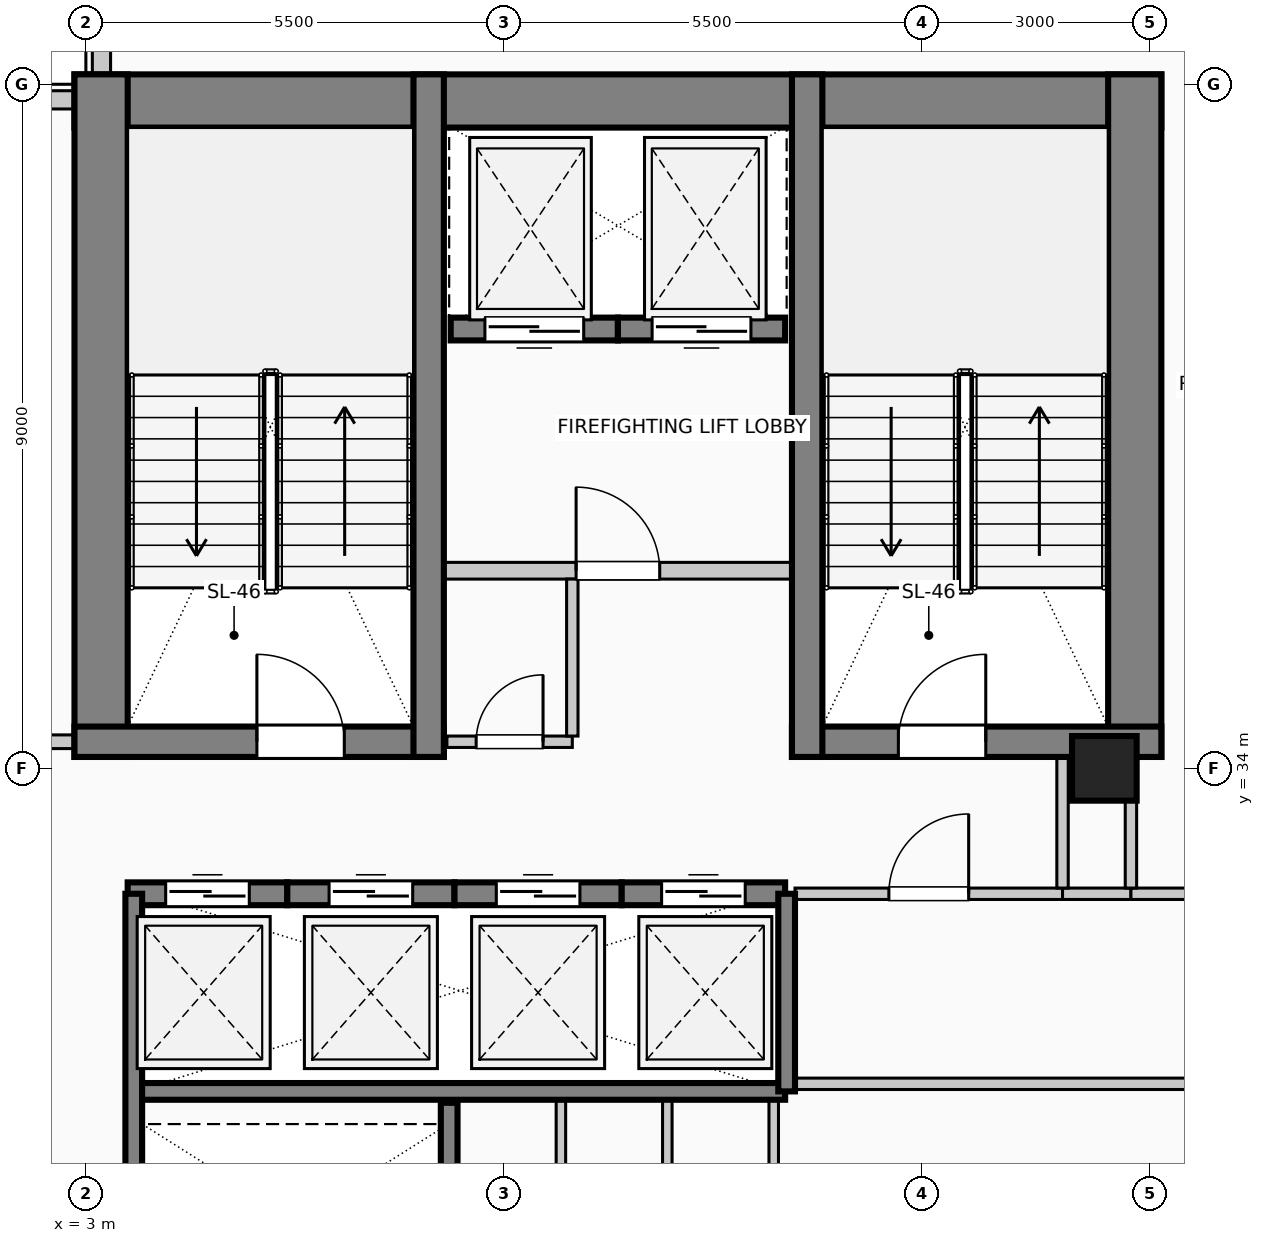
"""IFC4 building model, lengths in metres.
Left out: names, types, materials, properties, quantities, classifications, styles, units other than length and angle.
Written with IfcOpenShell. Run it as: python <this file> out.ifc"""

import sys

from ifc_helpers import new_model, si_unit, direction, frame, frame_2d, origin, origin_2d, place, context, subcontext, project, spatial, rectangle, circle, extrude, element, fill, save


model = new_model("IFC4")
c1 = context("Model", 3, precision=1e-05, world=origin(), true_north=direction((0.0, 1.0)))
c2 = subcontext(c1, "Body", "Model", "MODEL_VIEW")
j1 = project(units=[si_unit("LENGTHUNIT", "METRE"), si_unit("PLANEANGLEUNIT", "RADIAN")], contexts=[c1])
p1 = place(None, origin())
s1 = spatial("IfcSite", under=j1, at=p1, CompositionType="ELEMENT")
p2 = place(p1, origin())
s2 = spatial("IfcBuilding", under=s1, at=p2, CompositionType="ELEMENT")
p3 = place(p2, frame((0.0, 0.0, 248.6)))
s3 = spatial("IfcBuildingStorey", under=s2, at=p3, CompositionType="ELEMENT", Elevation=248.6)
p4 = place(p3, frame((2.85, 42.78, 0.0), z_axis=(0.0, 0.0, 1.0), x_axis=(1.0, 0.0, 0.0)))
e1 = element("IfcWall", 1, at=p4, inside=s3, PredefinedType="SHEAR", context=c2, shape_type="SweptSolid", body=[
    extrude(rectangle(XDim=14.3, YDim=0.7, at=frame_2d((7.15, 0.0))), origin(), (0.0, 0.0, 1.0), 4.0),
])
for number, where, z_axis, x_axis in (
    (2, (3.2, 34.15, 0.0), (0.0, 0.0, 1.0), (0.0, 1.0, 0.0)),
    (3, (16.8, 34.15, 0.0), (0.0, 0.0, 1.0), (0.0, 1.0, 0.0)),
):
    element("IfcWall", number, at=place(p3, frame(where, z_axis=z_axis, x_axis=x_axis)), inside=s3, PredefinedType="SHEAR", context=c2, shape_type="SweptSolid", body=[
        extrude(rectangle(XDim=8.98, YDim=0.7, at=frame_2d((4.49, 0.0))), origin(), (0.0, 0.0, 1.0), 4.0),
    ])
p5 = place(p3, frame((2.85, 34.35, 0.0), z_axis=(0.0, 0.0, 1.0), x_axis=(1.0, 0.0, 0.0)))
e4 = element("IfcWall", 4, at=p5, inside=s3, PredefinedType="SHEAR", context=c2, shape_type="SweptSolid", body=[
    extrude(rectangle(XDim=4.86, YDim=0.4, at=frame_2d((2.43, 0.0))), origin(), (0.0, 0.0, 1.0), 4.0),
])
p6 = place(p5, frame((2.4, 0.0, 0.0)))
e5 = element("IfcOpeningElement", 5, at=p6, cuts=e4, PredefinedType="OPENING", context=c2, shape_type="SweptSolid", body=[
    extrude(rectangle(XDim=1.15, YDim=2.2, at=frame_2d((0.575, 1.1))), frame((0.0, 0.21, 0.0), z_axis=(0.0, -1.0, 0.0), x_axis=(1.0, 0.0, 0.0)), (0.0, 0.0, 1.0), 0.42),
])
p7 = place(p3, frame((12.29, 34.35, 0.0), z_axis=(0.0, 0.0, 1.0), x_axis=(1.0, 0.0, 0.0)))
e6 = element("IfcWall", 6, at=p7, inside=s3, PredefinedType="SHEAR", context=c2, shape_type="SweptSolid", body=[
    extrude(rectangle(XDim=4.86, YDim=0.4, at=frame_2d((2.43, 0.0))), origin(), (0.0, 0.0, 1.0), 4.0),
])
p8 = place(p7, frame((1.4, 0.0, 0.0)))
e7 = element("IfcOpeningElement", 7, at=p8, cuts=e6, PredefinedType="OPENING", context=c2, shape_type="SweptSolid", body=[
    extrude(rectangle(XDim=1.15, YDim=2.2, at=frame_2d((0.575, 1.1))), frame((0.0, 0.21, 0.0), z_axis=(0.0, -1.0, 0.0), x_axis=(1.0, 0.0, 0.0)), (0.0, 0.0, 1.0), 0.42),
])
for number, where, z_axis, x_axis in (
    (8, (7.51, 34.15, 0.0), (0.0, 0.0, 1.0), (0.0, 1.0, 0.0)),
    (9, (12.49, 34.15, 0.0), (0.0, 0.0, 1.0), (0.0, 1.0, 0.0)),
):
    element("IfcWall", number, at=place(p3, frame(where, z_axis=z_axis, x_axis=x_axis)), inside=s3, PredefinedType="SHEAR", context=c2, shape_type="SweptSolid", body=[
        extrude(rectangle(XDim=8.98, YDim=0.4, at=frame_2d((4.49, 0.0))), origin(), (0.0, 0.0, 1.0), 4.0),
    ])
p9 = place(p3, frame((16.4, 34.0, 0.0), z_axis=(0.0, 0.0, 1.0), x_axis=(1.0, 0.0, 0.0)))
e10 = element("IfcColumn", 10, at=p9, inside=s3, PredefinedType="COLUMN", context=c2, shape_type="SweptSolid", body=[
    extrude(circle(Radius=0.425, at=origin_2d()), origin(), (0.0, 0.0, 1.0), 4.0),
])
p10 = place(p3, frame((0.6, 42.795, 0.0), z_axis=(0.0, 0.0, 1.0), x_axis=(1.0, 0.0, 0.0)))
e11 = element("IfcWall", 11, at=p10, inside=s3, PredefinedType="SOLIDWALL", context=c2, shape_type="SweptSolid", body=[
    extrude(rectangle(XDim=2.245, YDim=0.24, at=frame_2d((1.123, 0.0))), origin(), (0.0, 0.0, 1.0), 3.75),
])
p11 = place(p3, frame((3.205, 43.135, 0.0), z_axis=(0.0, 0.0, 1.0), x_axis=(0.0, 1.0, 0.0)))
e12 = element("IfcWall", 12, at=p11, inside=s3, PredefinedType="SOLIDWALL", context=c2, shape_type="SweptSolid", body=[
    extrude(rectangle(XDim=2.265, YDim=0.24, at=frame_2d((1.132, 0.0))), origin(), (0.0, 0.0, 1.0), 3.75),
])
p12 = place(p3, frame((3.55, 32.35, 0.0), z_axis=(0.0, 0.0, 1.0), x_axis=(1.0, 0.0, 0.0)))
e13 = element("IfcWall", 13, at=p12, inside=s3, PredefinedType="SOLIDWALL", context=c2, shape_type="SweptSolid", body=[
    extrude(rectangle(XDim=2.1, YDim=0.3, at=frame_2d((1.05, 0.0))), origin(), (0.0, 0.0, 1.0), 4.0),
])
p13 = place(p12, frame((0.5, 0.0, 0.0)))
e14 = element("IfcOpeningElement", 14, at=p13, cuts=e13, PredefinedType="OPENING", context=c2, shape_type="SweptSolid", body=[
    extrude(rectangle(XDim=1.1, YDim=2.2, at=frame_2d((0.55, 1.1))), frame((0.0, 0.16, 0.0), z_axis=(0.0, -1.0, 0.0), x_axis=(1.0, 0.0, 0.0)), (0.0, 0.0, 1.0), 0.32),
])
p14 = place(p3, frame((5.65, 32.35, 0.0), z_axis=(0.0, 0.0, 1.0), x_axis=(1.0, 0.0, 0.0)))
e15 = element("IfcWall", 15, at=p14, inside=s3, PredefinedType="SOLIDWALL", context=c2, shape_type="SweptSolid", body=[
    extrude(rectangle(XDim=2.2, YDim=0.3, at=frame_2d((1.1, 0.0))), origin(), (0.0, 0.0, 1.0), 4.0),
])
p15 = place(p14, frame((0.55, 0.0, 0.0)))
e16 = element("IfcOpeningElement", 16, at=p15, cuts=e15, PredefinedType="OPENING", context=c2, shape_type="SweptSolid", body=[
    extrude(rectangle(XDim=1.1, YDim=2.2, at=frame_2d((0.55, 1.1))), frame((0.0, 0.16, 0.0), z_axis=(0.0, -1.0, 0.0), x_axis=(1.0, 0.0, 0.0)), (0.0, 0.0, 1.0), 0.32),
])
p16 = place(p3, frame((7.85, 32.35, 0.0), z_axis=(0.0, 0.0, 1.0), x_axis=(1.0, 0.0, 0.0)))
e17 = element("IfcWall", 17, at=p16, inside=s3, PredefinedType="SOLIDWALL", context=c2, shape_type="SweptSolid", body=[
    extrude(rectangle(XDim=2.2, YDim=0.3, at=frame_2d((1.1, 0.0))), origin(), (0.0, 0.0, 1.0), 4.0),
])
p17 = place(p16, frame((0.55, 0.0, 0.0)))
e18 = element("IfcOpeningElement", 18, at=p17, cuts=e17, PredefinedType="OPENING", context=c2, shape_type="SweptSolid", body=[
    extrude(rectangle(XDim=1.1, YDim=2.2, at=frame_2d((0.55, 1.1))), frame((0.0, 0.16, 0.0), z_axis=(0.0, -1.0, 0.0), x_axis=(1.0, 0.0, 0.0)), (0.0, 0.0, 1.0), 0.32),
])
p18 = place(p3, frame((10.05, 32.35, 0.0), z_axis=(0.0, 0.0, 1.0), x_axis=(1.0, 0.0, 0.0)))
e19 = element("IfcWall", 19, at=p18, inside=s3, PredefinedType="SOLIDWALL", context=c2, shape_type="SweptSolid", body=[
    extrude(rectangle(XDim=2.15, YDim=0.3, at=frame_2d((1.075, 0.0))), origin(), (0.0, 0.0, 1.0), 4.0),
])
p19 = place(p18, frame((0.525, 0.0, 0.0)))
e20 = element("IfcOpeningElement", 20, at=p19, cuts=e19, PredefinedType="OPENING", context=c2, shape_type="SweptSolid", body=[
    extrude(rectangle(XDim=1.1, YDim=2.2, at=frame_2d((0.55, 1.1))), frame((0.0, 0.16, 0.0), z_axis=(0.0, -1.0, 0.0), x_axis=(1.0, 0.0, 0.0)), (0.0, 0.0, 1.0), 0.32),
])
p20 = place(p3, frame((10.0, 39.78, 0.0), z_axis=(0.0, 0.0, 1.0), x_axis=(-1.0, 0.0, 0.0)))
e21 = element("IfcWall", 21, at=p20, inside=s3, PredefinedType="SOLIDWALL", context=c2, shape_type="SweptSolid", body=[
    extrude(rectangle(XDim=2.2, YDim=0.3, at=frame_2d((1.1, 0.0))), origin(), (0.0, 0.0, 1.0), 4.0),
])
p21 = place(p20, frame((0.45, 0.0, 0.0)))
e22 = element("IfcOpeningElement", 22, at=p21, cuts=e21, PredefinedType="OPENING", context=c2, shape_type="SweptSolid", body=[
    extrude(rectangle(XDim=1.3, YDim=2.25, at=frame_2d((0.65, 1.125))), frame((0.0, 0.16, 0.0), z_axis=(0.0, -1.0, 0.0), x_axis=(1.0, 0.0, 0.0)), (0.0, 0.0, 1.0), 0.32),
])
p22 = place(p3, frame((12.2, 39.78, 0.0), z_axis=(0.0, 0.0, 1.0), x_axis=(-1.0, 0.0, 0.0)))
e23 = element("IfcWall", 23, at=p22, inside=s3, PredefinedType="SOLIDWALL", context=c2, shape_type="SweptSolid", body=[
    extrude(rectangle(XDim=2.2, YDim=0.3, at=frame_2d((1.1, 0.0))), origin(), (0.0, 0.0, 1.0), 4.0),
])
p23 = place(p22, frame((0.45, 0.0, 0.0)))
e24 = element("IfcOpeningElement", 24, at=p23, cuts=e23, PredefinedType="OPENING", context=c2, shape_type="SweptSolid", body=[
    extrude(rectangle(XDim=1.3, YDim=2.25, at=frame_2d((0.65, 1.125))), frame((0.0, 0.16, 0.0), z_axis=(0.0, -1.0, 0.0), x_axis=(1.0, 0.0, 0.0)), (0.0, 0.0, 1.0), 0.32),
])
p24 = place(p3, frame((3.55, 29.75, 0.0), z_axis=(0.0, 0.0, 1.0), x_axis=(1.0, 0.0, 0.0)))
e25 = element("IfcWall", 25, at=p24, inside=s3, PredefinedType="SOLIDWALL", context=c2, shape_type="SweptSolid", body=[
    extrude(rectangle(XDim=8.65, YDim=0.22, at=frame_2d((4.325, 0.0))), origin(), (0.0, 0.0, 1.0), 4.0),
])
p25 = place(p3, frame((3.63, 26.8, 0.0), z_axis=(0.0, 0.0, 1.0), x_axis=(0.0, 1.0, 0.0)))
e26 = element("IfcWall", 26, at=p25, inside=s3, PredefinedType="SOLIDWALL", context=c2, shape_type="SweptSolid", body=[
    extrude(rectangle(XDim=5.55, YDim=0.22, at=frame_2d((2.775, 0.0))), origin(), (0.0, 0.0, 1.0), 4.0),
])
p26 = place(p3, frame((7.78, 26.8, 0.0), z_axis=(0.0, 0.0, 1.0), x_axis=(0.0, 1.0, 0.0)))
e27 = element("IfcWall", 27, at=p26, inside=s3, PredefinedType="SOLIDWALL", context=c2, shape_type="SweptSolid", body=[
    extrude(rectangle(XDim=2.8, YDim=0.22, at=frame_2d((1.4, 0.0))), origin(), (0.0, 0.0, 1.0), 4.0),
])
p27 = place(p3, frame((12.22, 29.75, 0.0), z_axis=(0.0, 0.0, 1.0), x_axis=(0.0, 1.0, 0.0)))
e28 = element("IfcWall", 28, at=p27, inside=s3, PredefinedType="SOLIDWALL", context=c2, shape_type="SweptSolid", body=[
    extrude(rectangle(XDim=2.6, YDim=0.22, at=frame_2d((1.3, 0.0))), origin(), (0.0, 0.0, 1.0), 4.0),
])
p28 = place(p3, frame((7.51, 36.6, 0.0), z_axis=(0.0, 0.0, 1.0), x_axis=(1.0, 0.0, 0.0)))
e29 = element("IfcWall", 29, at=p28, inside=s3, PredefinedType="PARTITIONING", context=c2, shape_type="SweptSolid", body=[
    extrude(rectangle(XDim=4.98, YDim=0.22, at=frame_2d((2.49, 0.0))), origin(), (0.0, 0.0, 1.0), 3.75),
])
p29 = place(p28, frame((1.94, 0.0, 0.0)))
e30 = element("IfcOpeningElement", 30, at=p29, cuts=e29, PredefinedType="OPENING", context=c2, shape_type="SweptSolid", body=[
    extrude(rectangle(XDim=1.1, YDim=2.2, at=frame_2d((0.55, 1.1))), frame((0.0, 0.12, 0.0), z_axis=(0.0, -1.0, 0.0), x_axis=(1.0, 0.0, 0.0)), (0.0, 0.0, 1.0), 0.24),
])
p30 = place(p3, frame((12.33, 29.85, 0.0), z_axis=(0.0, 0.0, 1.0), x_axis=(1.0, 0.0, 0.0)))
e31 = element("IfcWall", 31, at=p30, inside=s3, PredefinedType="PARTITIONING", context=c2, shape_type="SweptSolid", body=[
    extrude(rectangle(XDim=8.67, YDim=0.15, at=frame_2d((4.335, 0.0))), origin(), (0.0, 0.0, 1.0), 3.75),
])
p31 = place(p3, frame((12.33, 32.35, 0.0), z_axis=(0.0, 0.0, 1.0), x_axis=(1.0, 0.0, 0.0)))
e32 = element("IfcWall", 32, at=p31, inside=s3, PredefinedType="PARTITIONING", context=c2, shape_type="SweptSolid", body=[
    extrude(rectangle(XDim=3.52, YDim=0.15, at=frame_2d((1.76, 0.0))), origin(), (0.0, 0.0, 1.0), 3.75),
])
p32 = place(p31, frame((1.235, 0.0, 0.0)))
e33 = element("IfcOpeningElement", 33, at=p32, cuts=e32, PredefinedType="OPENING", context=c2, shape_type="SweptSolid", body=[
    extrude(rectangle(XDim=1.05, YDim=2.15, at=frame_2d((0.525, 1.075))), frame((0.0, 0.085, 0.0), z_axis=(0.0, -1.0, 0.0), x_axis=(1.0, 0.0, 0.0)), (0.0, 0.0, 1.0), 0.17),
])
p33 = place(p3, frame((15.85, 32.35, 0.0), z_axis=(0.0, 0.0, 1.0), x_axis=(1.0, 0.0, 0.0)))
e34 = element("IfcWall", 34, at=p33, inside=s3, PredefinedType="PARTITIONING", context=c2, shape_type="SweptSolid", body=[
    extrude(rectangle(XDim=0.9, YDim=0.15, at=frame_2d((0.45, 0.0))), origin(), (0.0, 0.0, 1.0), 3.75),
])
p34 = place(p3, frame((16.75, 32.35, 0.0), z_axis=(0.0, 0.0, 1.0), x_axis=(1.0, 0.0, 0.0)))
e35 = element("IfcWall", 35, at=p34, inside=s3, PredefinedType="PARTITIONING", context=c2, shape_type="SweptSolid", body=[
    extrude(rectangle(XDim=4.25, YDim=0.15, at=frame_2d((2.125, 0.0))), origin(), (0.0, 0.0, 1.0), 3.75),
])
p35 = place(p3, frame((1.1, 34.35, 0.0), z_axis=(0.0, 0.0, 1.0), x_axis=(1.0, 0.0, 0.0)))
e36 = element("IfcWall", 36, at=p35, inside=s3, PredefinedType="PARTITIONING", context=c2, shape_type="SweptSolid", body=[
    extrude(rectangle(XDim=1.75, YDim=0.18, at=frame_2d((0.875, 0.0))), origin(), (0.0, 0.0, 1.0), 3.75),
])
p36 = place(p3, frame((7.75, 34.35, 0.0), z_axis=(0.0, 0.0, 1.0), x_axis=(1.0, 0.0, 0.0)))
e37 = element("IfcWall", 37, at=p36, inside=s3, PredefinedType="PARTITIONING", context=c2, shape_type="SweptSolid", body=[
    extrude(rectangle(XDim=1.65, YDim=0.15, at=frame_2d((0.825, 0.0))), origin(), (0.0, 0.0, 1.0), 3.75),
])
p37 = place(p36, frame((0.385, 0.0, 0.0)))
e38 = element("IfcOpeningElement", 38, at=p37, cuts=e37, PredefinedType="OPENING", context=c2, shape_type="SweptSolid", body=[
    extrude(rectangle(XDim=0.88, YDim=2.1, at=frame_2d((0.44, 1.05))), frame((0.0, 0.085, 0.0), z_axis=(0.0, -1.0, 0.0), x_axis=(1.0, 0.0, 0.0)), (0.0, 0.0, 1.0), 0.17),
])
p38 = place(p3, frame((9.25, 26.863, 0.0), z_axis=(0.0, 0.0, 1.0), x_axis=(0.0, 1.0, 0.0)))
e39 = element("IfcWall", 39, at=p38, inside=s3, PredefinedType="PARTITIONING", context=c2, shape_type="SweptSolid", body=[
    extrude(rectangle(XDim=2.777, YDim=0.125, at=frame_2d((1.389, 0.0))), origin(), (0.0, 0.0, 1.0), 3.75),
])
p39 = place(p3, frame((9.4, 34.425, 0.0), z_axis=(0.0, 0.0, 1.0), x_axis=(0.0, 1.0, 0.0)))
e40 = element("IfcWall", 40, at=p39, inside=s3, PredefinedType="PARTITIONING", context=c2, shape_type="SweptSolid", body=[
    extrude(rectangle(XDim=2.065, YDim=0.15, at=frame_2d((1.032, 0.0))), origin(), (0.0, 0.0, 1.0), 3.75),
])
for number, where, z_axis, x_axis in (
    (41, (10.65, 26.863, 0.0), (0.0, 0.0, 1.0), (0.0, 1.0, 0.0)),
    (42, (12.05, 26.863, 0.0), (0.0, 0.0, 1.0), (0.0, 1.0, 0.0)),
):
    element("IfcWall", number, at=place(p3, frame(where, z_axis=z_axis, x_axis=x_axis)), inside=s3, PredefinedType="PARTITIONING", context=c2, shape_type="SweptSolid", body=[
        extrude(rectangle(XDim=2.777, YDim=0.125, at=frame_2d((1.389, 0.0))), origin(), (0.0, 0.0, 1.0), 3.75),
    ])
p40 = place(p3, frame((15.85, 32.425, 0.0), z_axis=(0.0, 0.0, 1.0), x_axis=(0.0, 1.0, 0.0)))
e43 = element("IfcWall", 43, at=p40, inside=s3, PredefinedType="PARTITIONING", context=c2, shape_type="SweptSolid", body=[
    extrude(rectangle(XDim=1.725, YDim=0.15, at=frame_2d((0.862, 0.0))), origin(), (0.0, 0.0, 1.0), 3.75),
])
p41 = place(p3, frame((16.75, 32.425, 0.0), z_axis=(0.0, 0.0, 1.0), x_axis=(0.0, 1.0, 0.0)))
e44 = element("IfcWall", 44, at=p41, inside=s3, PredefinedType="PARTITIONING", context=c2, shape_type="SweptSolid", body=[
    extrude(rectangle(XDim=1.15, YDim=0.15, at=frame_2d((0.575, 0.0))), origin(), (0.0, 0.0, 1.0), 3.75),
])
p42 = place(p13, origin())
e45 = element("IfcDoor", 45, at=p42, inside=s3, OperationType="SLIDING_TO_LEFT", PredefinedType="DOOR", context=c2, shape_type="SweptSolid", body=[
    extrude(rectangle(XDim=1.1, YDim=2.2, at=frame_2d((0.55, 1.1))), frame((0.0, 0.025, 0.0), z_axis=(0.0, -1.0, 0.0), x_axis=(1.0, 0.0, 0.0)), (0.0, 0.0, 1.0), 0.05),
])
fill(e14, e45)
p43 = place(p15, origin())
e46 = element("IfcDoor", 46, at=p43, inside=s3, OperationType="SLIDING_TO_RIGHT", PredefinedType="DOOR", context=c2, shape_type="SweptSolid", body=[
    extrude(rectangle(XDim=1.1, YDim=2.2, at=frame_2d((0.55, 1.1))), frame((0.0, 0.025, 0.0), z_axis=(0.0, -1.0, 0.0), x_axis=(1.0, 0.0, 0.0)), (0.0, 0.0, 1.0), 0.05),
])
fill(e16, e46)
p44 = place(p17, origin())
e47 = element("IfcDoor", 47, at=p44, inside=s3, OperationType="SLIDING_TO_LEFT", PredefinedType="DOOR", context=c2, shape_type="SweptSolid", body=[
    extrude(rectangle(XDim=1.1, YDim=2.2, at=frame_2d((0.55, 1.1))), frame((0.0, 0.025, 0.0), z_axis=(0.0, -1.0, 0.0), x_axis=(1.0, 0.0, 0.0)), (0.0, 0.0, 1.0), 0.05),
])
fill(e18, e47)
p45 = place(p19, origin())
e48 = element("IfcDoor", 48, at=p45, inside=s3, OperationType="SLIDING_TO_RIGHT", PredefinedType="DOOR", context=c2, shape_type="SweptSolid", body=[
    extrude(rectangle(XDim=1.1, YDim=2.2, at=frame_2d((0.55, 1.1))), frame((0.0, 0.025, 0.0), z_axis=(0.0, -1.0, 0.0), x_axis=(1.0, 0.0, 0.0)), (0.0, 0.0, 1.0), 0.05),
])
fill(e20, e48)
p46 = place(p21, origin())
e49 = element("IfcDoor", 49, at=p46, inside=s3, OperationType="SLIDING_TO_LEFT", PredefinedType="DOOR", context=c2, shape_type="SweptSolid", body=[
    extrude(rectangle(XDim=1.3, YDim=2.25, at=frame_2d((0.65, 1.125))), frame((0.0, 0.025, 0.0), z_axis=(0.0, -1.0, 0.0), x_axis=(1.0, 0.0, 0.0)), (0.0, 0.0, 1.0), 0.05),
])
fill(e22, e49)
p47 = place(p23, origin())
e50 = element("IfcDoor", 50, at=p47, inside=s3, OperationType="SLIDING_TO_RIGHT", PredefinedType="DOOR", context=c2, shape_type="SweptSolid", body=[
    extrude(rectangle(XDim=1.3, YDim=2.25, at=frame_2d((0.65, 1.125))), frame((0.0, 0.025, 0.0), z_axis=(0.0, -1.0, 0.0), x_axis=(1.0, 0.0, 0.0)), (0.0, 0.0, 1.0), 0.05),
])
fill(e24, e50)
p48 = place(p6, origin())
e51 = element("IfcDoor", 51, at=p48, inside=s3, OperationType="SINGLE_SWING_LEFT", PredefinedType="DOOR", context=c2, shape_type="SweptSolid", body=[
    extrude(rectangle(XDim=1.15, YDim=2.2, at=frame_2d((0.575, 1.1))), frame((0.0, 0.025, 0.0), z_axis=(0.0, -1.0, 0.0), x_axis=(1.0, 0.0, 0.0)), (0.0, 0.0, 1.0), 0.05),
])
fill(e5, e51)
p49 = place(p8, origin())
e52 = element("IfcDoor", 52, at=p49, inside=s3, OperationType="SINGLE_SWING_RIGHT", PredefinedType="DOOR", context=c2, shape_type="SweptSolid", body=[
    extrude(rectangle(XDim=1.15, YDim=2.2, at=frame_2d((0.575, 1.1))), frame((0.0, 0.025, 0.0), z_axis=(0.0, -1.0, 0.0), x_axis=(1.0, 0.0, 0.0)), (0.0, 0.0, 1.0), 0.05),
])
fill(e7, e52)
p50 = place(p29, origin())
e53 = element("IfcDoor", 53, at=p50, inside=s3, OperationType="SINGLE_SWING_LEFT", PredefinedType="DOOR", context=c2, shape_type="SweptSolid", body=[
    extrude(rectangle(XDim=1.1, YDim=2.2, at=frame_2d((0.55, 1.1))), frame((0.0, 0.025, 0.0), z_axis=(0.0, -1.0, 0.0), x_axis=(1.0, 0.0, 0.0)), (0.0, 0.0, 1.0), 0.05),
])
fill(e30, e53)
p51 = place(p32, origin())
e54 = element("IfcDoor", 54, at=p51, inside=s3, OperationType="SINGLE_SWING_RIGHT", PredefinedType="DOOR", context=c2, shape_type="SweptSolid", body=[
    extrude(rectangle(XDim=1.05, YDim=2.15, at=frame_2d((0.525, 1.075))), frame((0.0, 0.025, 0.0), z_axis=(0.0, -1.0, 0.0), x_axis=(1.0, 0.0, 0.0)), (0.0, 0.0, 1.0), 0.05),
])
fill(e33, e54)
p52 = place(p37, origin())
e55 = element("IfcDoor", 55, at=p52, inside=s3, OperationType="SINGLE_SWING_RIGHT", PredefinedType="DOOR", context=c2, shape_type="SweptSolid", body=[
    extrude(rectangle(XDim=0.88, YDim=2.1, at=frame_2d((0.44, 1.05))), frame((0.0, 0.025, 0.0), z_axis=(0.0, -1.0, 0.0), x_axis=(1.0, 0.0, 0.0)), (0.0, 0.0, 1.0), 0.05),
])
fill(e38, e55)
save(model, sys.argv[1])
